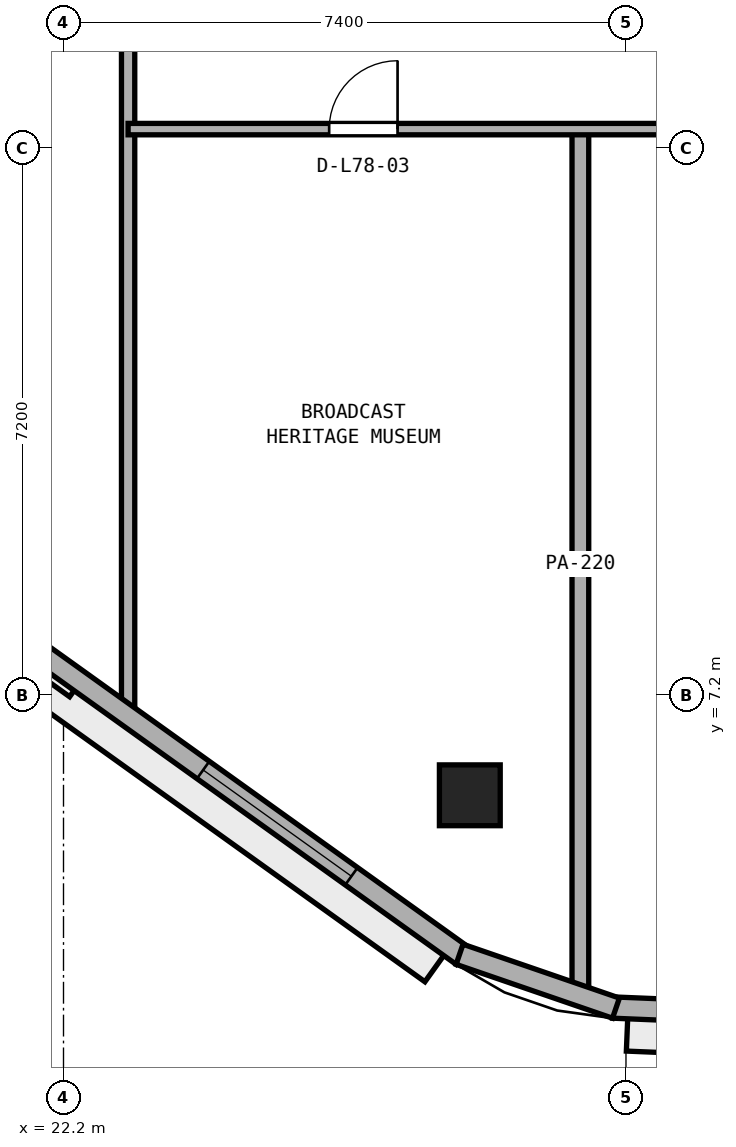
"""IFC4 building model, lengths in metres.
Left out: names, types, materials, properties, quantities, classifications, styles, units other than length and angle.
Written with IfcOpenShell. Run it as: python <this file> out.ifc"""

import sys

from ifc_helpers import new_model, si_unit, direction, frame, frame_2d, origin, origin_2d, place, context, subcontext, project, spatial, rectangle, extrude, element, fill, save


model = new_model("IFC4")
c1 = context("Model", 3, precision=1e-05, world=origin(), true_north=direction((0.0, 1.0)))
c2 = subcontext(c1, "Body", "Model", "MODEL_VIEW")
j1 = project(units=[si_unit("LENGTHUNIT", "METRE"), si_unit("PLANEANGLEUNIT", "RADIAN")], contexts=[c1])
p1 = place(None, origin())
s1 = spatial("IfcSite", under=j1, at=p1, CompositionType="ELEMENT")
p2 = place(p1, origin())
s2 = spatial("IfcBuilding", under=s1, at=p2, CompositionType="ELEMENT")
p3 = place(p2, frame((0.0, 0.0, 304.8)))
s3 = spatial("IfcBuildingStorey", under=s2, at=p3, CompositionType="ELEMENT", Elevation=304.8)
p4 = place(p3, frame((27.545, 5.886, 0.0), z_axis=(0.0, 0.0, 1.0), x_axis=(1.0, 0.0, 0.0)))
e1 = element("IfcColumn", 1, at=p4, inside=s3, PredefinedType="COLUMN", context=c2, shape_type="SweptSolid", body=[
    extrude(rectangle(XDim=0.8, YDim=0.8, at=origin_2d()), origin(), (0.0, 0.0, 1.0), 3.8),
])
p5 = place(p3, frame((29.0, 3.217, 0.0), z_axis=(0.0, 0.0, 1.0), x_axis=(0.0, 1.0, 0.0)))
e2 = element("IfcWall", 2, at=p5, inside=s3, PredefinedType="PARTITIONING", context=c2, shape_type="SweptSolid", body=[
    extrude(rectangle(XDim=11.433, YDim=0.22, at=frame_2d((5.716, 0.0))), origin(), (0.0, 0.0, 1.0), 3.4),
])
p6 = place(p3, frame((23.05, 6.894, 0.0), z_axis=(0.0, 0.0, 1.0), x_axis=(0.0, 1.0, 0.0)))
e3 = element("IfcWall", 3, at=p6, inside=s3, PredefinedType="PARTITIONING", context=c2, shape_type="SweptSolid", body=[
    extrude(rectangle(XDim=36.312, YDim=0.175, at=frame_2d((18.156, 0.0))), origin(), (0.0, 0.0, 1.0), 3.4),
])
p7 = place(p6, frame((9.031, 0.0, 0.0)))
e4 = element("IfcOpeningElement", 4, at=p7, cuts=e3, PredefinedType="OPENING", context=c2, shape_type="SweptSolid", body=[
    extrude(rectangle(XDim=0.9, YDim=2.1, at=frame_2d((0.45, 1.05))), frame((0.0, 0.097, 0.0), z_axis=(0.0, -1.0, 0.0), x_axis=(1.0, 0.0, 0.0)), (0.0, 0.0, 1.0), 0.195),
])
p8 = place(p6, frame((14.056, 0.0, 0.0)))
e5 = element("IfcOpeningElement", 5, at=p8, cuts=e3, PredefinedType="OPENING", context=c2, shape_type="SweptSolid", body=[
    extrude(rectangle(XDim=0.9, YDim=2.1, at=frame_2d((0.45, 1.05))), frame((0.0, 0.097, 0.0), z_axis=(0.0, -1.0, 0.0), x_axis=(1.0, 0.0, 0.0)), (0.0, 0.0, 1.0), 0.195),
])
p9 = place(p6, frame((20.606, 0.0, 0.0)))
e6 = element("IfcOpeningElement", 6, at=p9, cuts=e3, PredefinedType="OPENING", context=c2, shape_type="SweptSolid", body=[
    extrude(rectangle(XDim=1.0, YDim=2.12, at=frame_2d((0.5, 1.06))), frame((0.0, 0.097, 0.0), z_axis=(0.0, -1.0, 0.0), x_axis=(1.0, 0.0, 0.0)), (0.0, 0.0, 1.0), 0.195),
])
p10 = place(p6, frame((26.181, 0.0, 0.0)))
e7 = element("IfcOpeningElement", 7, at=p10, cuts=e3, PredefinedType="OPENING", context=c2, shape_type="SweptSolid", body=[
    extrude(rectangle(XDim=0.9, YDim=2.1, at=frame_2d((0.45, 1.05))), frame((0.0, 0.097, 0.0), z_axis=(0.0, -1.0, 0.0), x_axis=(1.0, 0.0, 0.0)), (0.0, 0.0, 1.0), 0.195),
])
p11 = place(p3, frame((23.05, 14.65, 0.0), z_axis=(0.0, 0.0, 1.0), x_axis=(1.0, 0.0, 0.0)))
e8 = element("IfcWall", 8, at=p11, inside=s3, PredefinedType="PARTITIONING", context=c2, shape_type="SweptSolid", body=[
    extrude(rectangle(XDim=12.6, YDim=0.15, at=frame_2d((6.3, 0.0))), origin(), (0.0, 0.0, 1.0), 3.4),
])
p12 = place(p11, frame((2.645, 0.0, 0.0)))
e9 = element("IfcOpeningElement", 9, at=p12, cuts=e8, PredefinedType="OPENING", context=c2, shape_type="SweptSolid", body=[
    extrude(rectangle(XDim=0.9, YDim=2.1, at=frame_2d((0.45, 1.05))), frame((0.0, 0.085, 0.0), z_axis=(0.0, -1.0, 0.0), x_axis=(1.0, 0.0, 0.0)), (0.0, 0.0, 1.0), 0.17),
])
p13 = place(p3, frame((29.428, 3.093, 0.0), z_axis=(0.0, 0.0, 1.0), x_axis=(0.999156257967, -0.041070331944, 0.0)))
e10 = element("IfcWall", 10, at=p13, inside=s3, PredefinedType="STANDARD", context=c2, shape_type="SweptSolid", body=[
    extrude(rectangle(XDim=16.876, YDim=0.28, at=frame_2d((8.438, 0.0))), origin(), (0.0, 0.0, 1.0), 3.4),
])
p14 = place(p13, frame((7.588, 0.0, 0.0)))
e11 = element("IfcOpeningElement", 11, at=p14, cuts=e10, PredefinedType="OPENING", context=c2, shape_type="SweptSolid", body=[
    extrude(rectangle(XDim=1.1, YDim=2.2, at=frame_2d((0.55, 1.1))), frame((0.0, 0.15, 0.0), z_axis=(0.0, -1.0, 0.0), x_axis=(1.0, 0.0, 0.0)), (0.0, 0.0, 1.0), 0.3),
])
p15 = place(p13, frame((1.946, 0.0, 0.9)))
e12 = element("IfcOpeningElement", 12, at=p15, cuts=e10, PredefinedType="OPENING", context=c2, shape_type="SweptSolid", body=[
    extrude(rectangle(XDim=2.4, YDim=1.75, at=frame_2d((1.2, 0.875))), frame((0.0, 0.15, 0.0), z_axis=(0.0, -1.0, 0.0), x_axis=(1.0, 0.0, 0.0)), (0.0, 0.0, 1.0), 0.3),
])
p16 = place(p13, frame((12.53, 0.0, 0.9)))
e13 = element("IfcOpeningElement", 13, at=p16, cuts=e10, PredefinedType="OPENING", context=c2, shape_type="SweptSolid", body=[
    extrude(rectangle(XDim=2.4, YDim=1.75, at=frame_2d((1.2, 0.875))), frame((0.0, 0.15, 0.0), z_axis=(0.0, -1.0, 0.0), x_axis=(1.0, 0.0, 0.0)), (0.0, 0.0, 1.0), 0.3),
])
p17 = place(p3, frame((14.468, 13.077, 0.0), z_axis=(0.0, 0.0, 1.0), x_axis=(0.812809888039, -0.582529042972, 0.0)))
e14 = element("IfcWall", 14, at=p17, inside=s3, PredefinedType="STANDARD", context=c2, shape_type="SweptSolid", body=[
    extrude(rectangle(XDim=15.968, YDim=0.28, at=frame_2d((7.984, 0.0))), origin(), (0.0, 0.0, 1.0), 3.4),
])
p18 = place(p17, frame((1.795, 0.0, 0.9)))
e15 = element("IfcOpeningElement", 15, at=p18, cuts=e14, PredefinedType="OPENING", context=c2, shape_type="SweptSolid", body=[
    extrude(rectangle(XDim=2.4, YDim=1.75, at=frame_2d((1.2, 0.875))), frame((0.0, 0.15, 0.0), z_axis=(0.0, -1.0, 0.0), x_axis=(1.0, 0.0, 0.0)), (0.0, 0.0, 1.0), 0.3),
])
p19 = place(p17, frame((6.784, 0.0, 0.9)))
e16 = element("IfcOpeningElement", 16, at=p19, cuts=e14, PredefinedType="OPENING", context=c2, shape_type="SweptSolid", body=[
    extrude(rectangle(XDim=2.4, YDim=1.75, at=frame_2d((1.2, 0.875))), frame((0.0, 0.15, 0.0), z_axis=(0.0, -1.0, 0.0), x_axis=(1.0, 0.0, 0.0)), (0.0, 0.0, 1.0), 0.3),
])
p20 = place(p17, frame((11.773, 0.0, 0.9)))
e17 = element("IfcOpeningElement", 17, at=p20, cuts=e14, PredefinedType="OPENING", context=c2, shape_type="SweptSolid", body=[
    extrude(rectangle(XDim=2.4, YDim=1.75, at=frame_2d((1.2, 0.875))), frame((0.0, 0.15, 0.0), z_axis=(0.0, -1.0, 0.0), x_axis=(1.0, 0.0, 0.0)), (0.0, 0.0, 1.0), 0.3),
])
p21 = place(p3, frame((27.411, 3.794, 0.0), z_axis=(0.0, 0.0, 1.0), x_axis=(0.945552869008, -0.325468542121, 0.0)))
e18 = element("IfcWall", 18, at=p21, inside=s3, PredefinedType="STANDARD", context=c2, shape_type="SweptSolid", body=[
    extrude(rectangle(XDim=2.176, YDim=0.28, at=frame_2d((1.088, 0.0))), origin(), (0.0, 0.0, 1.0), 3.4),
])
p22 = place(p12, origin())
e19 = element("IfcDoor", 19, at=p22, inside=s3, OperationType="SINGLE_SWING_RIGHT", PredefinedType="DOOR", context=c2, shape_type="SweptSolid", body=[
    extrude(rectangle(XDim=0.9, YDim=2.1, at=frame_2d((0.45, 1.05))), frame((0.0, 0.025, 0.0), z_axis=(0.0, -1.0, 0.0), x_axis=(1.0, 0.0, 0.0)), (0.0, 0.0, 1.0), 0.05),
])
fill(e9, e19)
p23 = place(p20, origin())
e20 = element("IfcWindow", 20, at=p23, inside=s3, PartitioningType="SINGLE_PANEL", PredefinedType="WINDOW", context=c2, shape_type="SweptSolid", body=[
    extrude(rectangle(XDim=2.4, YDim=1.75, at=frame_2d((1.2, 0.875))), frame((0.0, 0.03, 0.0), z_axis=(0.0, -1.0, 0.0), x_axis=(1.0, 0.0, 0.0)), (0.0, 0.0, 1.0), 0.06),
])
fill(e17, e20)
save(model, sys.argv[1])
